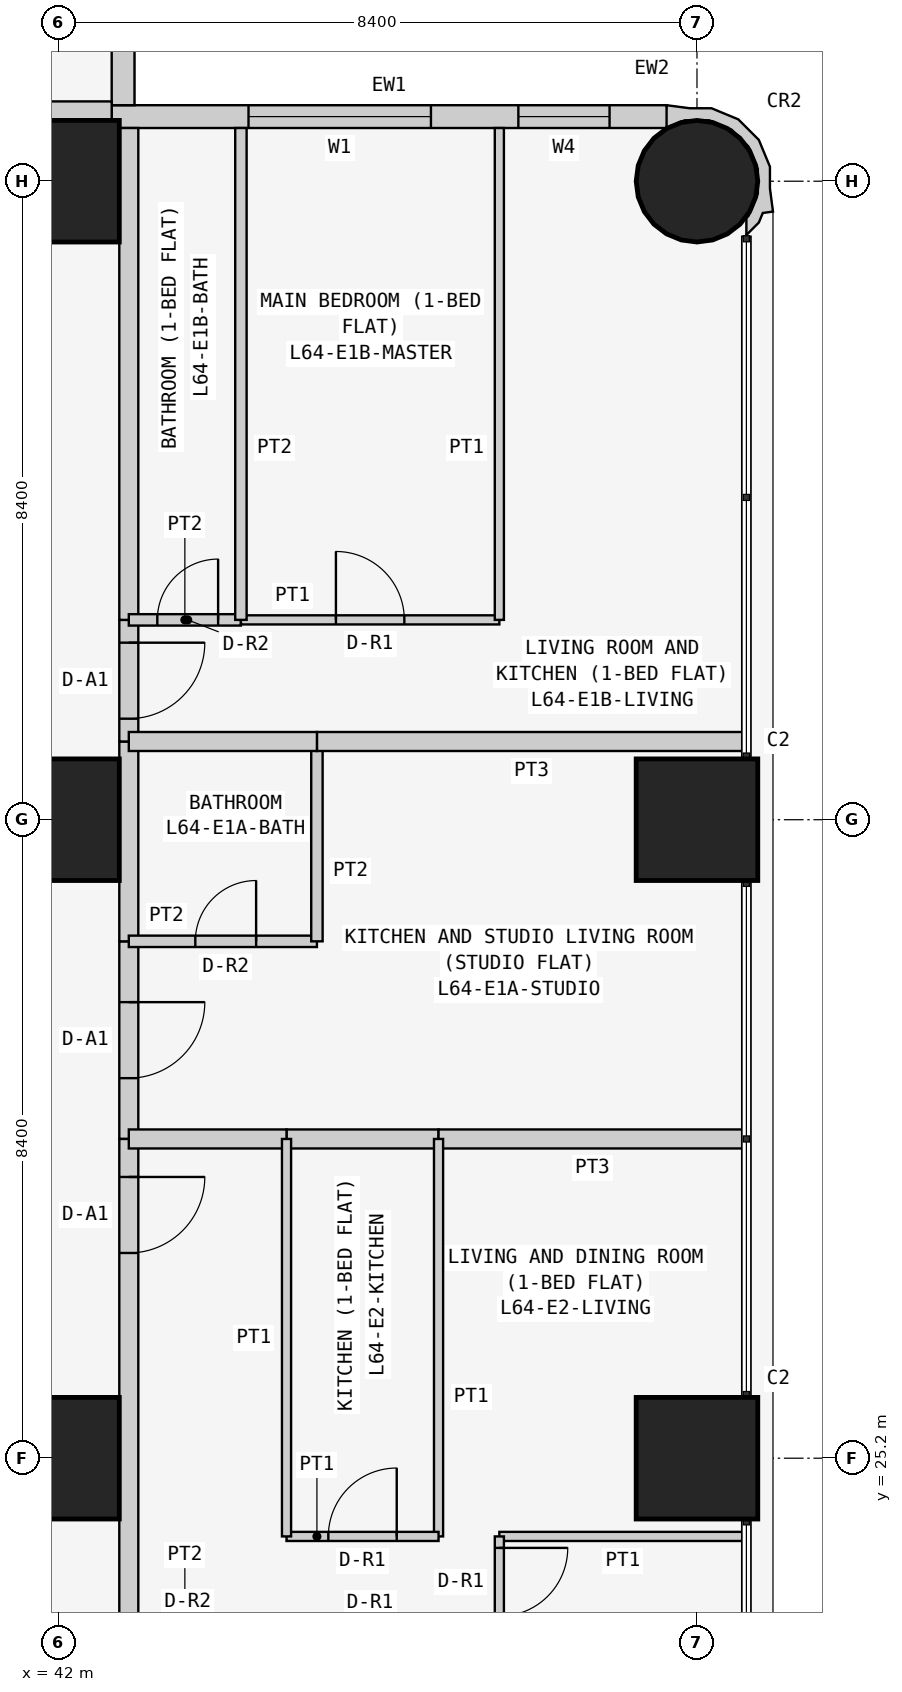
"""IFC4 building model, lengths in metres.
Left out: names, types, materials, properties, quantities, classifications, styles, units other than length and angle.
Written with IfcOpenShell. Run it as: python <this file> out.ifc"""

import sys

from ifc_helpers import new_model, si_unit, direction, frame, frame_2d, origin, origin_2d, place, context, subcontext, project, spatial, polyline, rectangle, circle, outline, extrude, element, fill, save


model = new_model("IFC4")
c1 = context("Model", 3, precision=1e-05, world=origin(), true_north=direction((0.0, 1.0)))
c2 = subcontext(c1, "Body", "Model", "MODEL_VIEW")
j1 = project(units=[si_unit("LENGTHUNIT", "METRE"), si_unit("PLANEANGLEUNIT", "RADIAN")], contexts=[c1])
p1 = place(None, origin())
s1 = spatial("IfcSite", under=j1, at=p1, CompositionType="ELEMENT")
p2 = place(p1, origin())
s2 = spatial("IfcBuilding", under=s1, at=p2, CompositionType="ELEMENT")
p3 = place(p2, frame((0.0, 0.0, 244.5)))
s3 = spatial("IfcBuildingStorey", under=s2, at=p3, CompositionType="ELEMENT", Elevation=244.5)
for number, where, z_axis, x_axis in (
    (1, (42.0, 25.2, 0.0), (0.0, 0.0, 1.0), (1.0, 0.0, 0.0)),
    (2, (42.0, 33.6, 0.0), (0.0, 0.0, 1.0), (1.0, 0.0, 0.0)),
    (3, (42.0, 42.0, 0.0), (0.0, 0.0, 1.0), (1.0, 0.0, 0.0)),
    (4, (50.4, 25.2, 0.0), (0.0, 0.0, 1.0), (1.0, 0.0, 0.0)),
    (5, (50.4, 33.6, 0.0), (0.0, 0.0, 1.0), (1.0, 0.0, 0.0)),
):
    element("IfcColumn", number, at=place(p3, frame(where, z_axis=z_axis, x_axis=x_axis)), inside=s3, PredefinedType="COLUMN", context=c2, shape_type="SweptSolid", body=[
        extrude(rectangle(XDim=1.6, YDim=1.6, at=origin_2d()), origin(), (0.0, 0.0, 1.0), 3.6),
    ])
p4 = place(p3, frame((50.4, 42.0, 0.0), z_axis=(0.0, 0.0, 1.0), x_axis=(1.0, 0.0, 0.0)))
e6 = element("IfcColumn", 6, at=p4, inside=s3, PredefinedType="COLUMN", context=c2, shape_type="SweptSolid", body=[
    extrude(circle(Radius=0.8, at=origin_2d()), origin(), (0.0, 0.0, 1.0), 3.6),
])
p5 = place(p3, frame((50.0, 42.85, 0.0), z_axis=(0.0, 0.0, 1.0), x_axis=(-1.0, 0.0, 0.0)))
e7 = element("IfcWall", 7, at=p5, inside=s3, PredefinedType="SOLIDWALL", context=c2, shape_type="SweptSolid", body=[
    extrude(rectangle(XDim=7.3, YDim=0.3, at=frame_2d((3.65, 0.0))), origin(), (0.0, 0.0, 1.0), 3.35),
])
p6 = place(p5, frame((3.1, 0.0, 0.9)))
e8 = element("IfcOpeningElement", 8, at=p6, cuts=e7, PredefinedType="OPENING", context=c2, shape_type="SweptSolid", body=[
    extrude(rectangle(XDim=2.4, YDim=1.5, at=frame_2d((1.2, 0.75))), frame((0.0, 0.16, 0.0), z_axis=(0.0, -1.0, 0.0), x_axis=(1.0, 0.0, 0.0)), (0.0, 0.0, 1.0), 0.32),
])
p7 = place(p5, frame((0.75, 0.0, 0.9)))
e9 = element("IfcOpeningElement", 9, at=p7, cuts=e7, PredefinedType="OPENING", context=c2, shape_type="SweptSolid", body=[
    extrude(rectangle(XDim=1.2, YDim=1.5, at=frame_2d((0.6, 0.75))), frame((0.0, 0.16, 0.0), z_axis=(0.0, -1.0, 0.0), x_axis=(1.0, 0.0, 0.0)), (0.0, 0.0, 1.0), 0.32),
])
p8 = place(p3, frame((42.85, 43.0, 0.0), z_axis=(0.0, 0.0, 1.0), x_axis=(0.0, 1.0, 0.0)))
e10 = element("IfcWall", 10, at=p8, inside=s3, PredefinedType="SOLIDWALL", context=c2, shape_type="SweptSolid", body=[
    extrude(rectangle(XDim=7.0, YDim=0.3, at=frame_2d((3.5, 0.0))), origin(), (0.0, 0.0, 1.0), 3.35),
])
p9 = place(p8, frame((1.5, 0.0, 0.9)))
e11 = element("IfcOpeningElement", 11, at=p9, cuts=e10, PredefinedType="OPENING", context=c2, shape_type="SweptSolid", body=[
    extrude(rectangle(XDim=2.4, YDim=1.5, at=frame_2d((1.2, 0.75))), frame((0.0, 0.16, 0.0), z_axis=(0.0, -1.0, 0.0), x_axis=(1.0, 0.0, 0.0)), (0.0, 0.0, 1.0), 0.32),
])
p10 = place(p8, frame((5.05, 0.0, 0.9)))
e12 = element("IfcOpeningElement", 12, at=p10, cuts=e10, PredefinedType="OPENING", context=c2, shape_type="SweptSolid", body=[
    extrude(rectangle(XDim=1.2, YDim=1.5, at=frame_2d((0.6, 0.75))), frame((0.0, 0.16, 0.0), z_axis=(0.0, -1.0, 0.0), x_axis=(1.0, 0.0, 0.0)), (0.0, 0.0, 1.0), 0.32),
])
p11 = place(p3, frame((50.995, 41.352, 0.0), z_axis=(0.0, 0.0, 1.0), x_axis=(0.93923434088, 0.343276641956, 0.0)))
e13 = element("IfcWall", 13, at=p11, inside=s3, PredefinedType="SOLIDWALL", context=c2, shape_type="SweptSolid", body=[
    extrude(outline(polyline([(0.532, 0.393), (0.631, 0.663), (0.614, 1.044), (0.453, 1.391), (0.172, 1.649), (-0.098, 1.748), (-0.369, 1.89), (-0.509, 1.621), (-0.491, 1.615), (-0.479, 1.609), (-0.211, 1.62), (0.088, 1.511), (0.323, 1.295), (0.457, 1.006), (0.47, 0.688), (0.361, 0.389), (0.145, 0.154), (0.108, 0.136), (0.031, -0.075), (0.241, 0.023), (0.333, 0.124), (0.465, 0.094), (0.532, 0.393)])), origin(), (0.0, 0.0, 1.0), 3.35),
])
p12 = place(p3, frame((35.829, 42.925, 0.0), z_axis=(0.0, 0.0, 1.0), x_axis=(1.0, 0.0, 0.0)))
e14 = element("IfcWall", 14, at=p12, inside=s3, PredefinedType="PARTITIONING", context=c2, shape_type="SweptSolid", body=[
    extrude(rectangle(XDim=6.871, YDim=0.25, at=frame_2d((3.436, 0.0))), origin(), (0.0, 0.0, 1.0), 3.35),
])
p13 = place(p3, frame((42.925, 32.0, 0.0), z_axis=(0.0, 0.0, 1.0), x_axis=(0.0, -1.0, 0.0)))
e15 = element("IfcWall", 15, at=p13, inside=s3, PredefinedType="PARTITIONING", context=c2, shape_type="SweptSolid", body=[
    extrude(rectangle(XDim=2.6, YDim=0.25, at=frame_2d((1.3, 0.0))), origin(), (0.0, 0.0, 1.0), 3.35),
])
p14 = place(p13, frame((0.8, 0.0, 0.0)))
e16 = element("IfcOpeningElement", 16, at=p14, cuts=e15, PredefinedType="OPENING", context=c2, shape_type="SweptSolid", body=[
    extrude(rectangle(XDim=1.0, YDim=2.1, at=frame_2d((0.5, 1.05))), frame((0.0, 0.135, 0.0), z_axis=(0.0, -1.0, 0.0), x_axis=(1.0, 0.0, 0.0)), (0.0, 0.0, 1.0), 0.27),
])
p15 = place(p3, frame((42.925, 34.629, 0.0), z_axis=(0.0, 0.0, 1.0), x_axis=(0.0, -1.0, 0.0)))
e17 = element("IfcWall", 17, at=p15, inside=s3, PredefinedType="PARTITIONING", context=c2, shape_type="SweptSolid", body=[
    extrude(rectangle(XDim=2.629, YDim=0.25, at=frame_2d((1.314, 0.0))), origin(), (0.0, 0.0, 1.0), 3.35),
])
p16 = place(p3, frame((42.925, 36.229, 0.0), z_axis=(0.0, 0.0, 1.0), x_axis=(0.0, -1.0, 0.0)))
e18 = element("IfcWall", 18, at=p16, inside=s3, PredefinedType="PARTITIONING", context=c2, shape_type="SweptSolid", body=[
    extrude(rectangle(XDim=1.6, YDim=0.25, at=frame_2d((0.8, 0.0))), origin(), (0.0, 0.0, 1.0), 3.35),
])
p17 = place(p16, frame((0.3, 0.0, 0.0)))
e19 = element("IfcOpeningElement", 19, at=p17, cuts=e18, PredefinedType="OPENING", context=c2, shape_type="SweptSolid", body=[
    extrude(rectangle(XDim=1.0, YDim=2.1, at=frame_2d((0.5, 1.05))), frame((0.0, 0.135, 0.0), z_axis=(0.0, -1.0, 0.0), x_axis=(1.0, 0.0, 0.0)), (0.0, 0.0, 1.0), 0.27),
])
p18 = place(p3, frame((42.925, 42.7, 0.0), z_axis=(0.0, 0.0, 1.0), x_axis=(0.0, -1.0, 0.0)))
e20 = element("IfcWall", 20, at=p18, inside=s3, PredefinedType="PARTITIONING", context=c2, shape_type="SweptSolid", body=[
    extrude(rectangle(XDim=6.471, YDim=0.25, at=frame_2d((3.235, 0.0))), origin(), (0.0, 0.0, 1.0), 3.35),
])
p19 = place(p3, frame((42.925, 29.4, 0.0), z_axis=(0.0, 0.0, 1.0), x_axis=(0.0, -1.0, 0.0)))
e21 = element("IfcWall", 21, at=p19, inside=s3, PredefinedType="PARTITIONING", context=c2, shape_type="SweptSolid", body=[
    extrude(rectangle(XDim=6.429, YDim=0.25, at=frame_2d((3.214, 0.0))), origin(), (0.0, 0.0, 1.0), 3.35),
])
p20 = place(p19, frame((0.5, 0.0, 0.0)))
e22 = element("IfcOpeningElement", 22, at=p20, cuts=e21, PredefinedType="OPENING", context=c2, shape_type="SweptSolid", body=[
    extrude(rectangle(XDim=1.0, YDim=2.1, at=frame_2d((0.5, 1.05))), frame((0.0, 0.135, 0.0), z_axis=(0.0, -1.0, 0.0), x_axis=(1.0, 0.0, 0.0)), (0.0, 0.0, 1.0), 0.27),
])
p21 = place(p3, frame((42.925, 32.0, 0.0), z_axis=(0.0, 0.0, 1.0), x_axis=(1.0, 0.0, 0.0)))
e23 = element("IfcWall", 23, at=p21, inside=s3, PredefinedType="PARTITIONING", context=c2, shape_type="SweptSolid", body=[
    extrude(rectangle(XDim=2.475, YDim=0.15, at=frame_2d((1.237, 0.0))), origin(), (0.0, 0.0, 1.0), 3.35),
])
p22 = place(p21, frame((0.875, 0.0, 0.0)))
e24 = element("IfcOpeningElement", 24, at=p22, cuts=e23, PredefinedType="OPENING", context=c2, shape_type="SweptSolid", body=[
    extrude(rectangle(XDim=0.8, YDim=2.1, at=frame_2d((0.4, 1.05))), frame((0.0, 0.085, 0.0), z_axis=(0.0, -1.0, 0.0), x_axis=(1.0, 0.0, 0.0)), (0.0, 0.0, 1.0), 0.17),
])
p23 = place(p3, frame((45.4, 32.0, 0.0), z_axis=(0.0, 0.0, 1.0), x_axis=(0.0, 1.0, 0.0)))
e25 = element("IfcWall", 25, at=p23, inside=s3, PredefinedType="PARTITIONING", context=c2, shape_type="SweptSolid", body=[
    extrude(rectangle(XDim=2.629, YDim=0.15, at=frame_2d((1.314, 0.0))), origin(), (0.0, 0.0, 1.0), 3.35),
])
p24 = place(p3, frame((45.4, 34.629, 0.0), z_axis=(0.0, 0.0, 1.0), x_axis=(1.0, 0.0, 0.0)))
e26 = element("IfcWall", 26, at=p24, inside=s3, PredefinedType="PARTITIONING", context=c2, shape_type="SweptSolid", body=[
    extrude(rectangle(XDim=5.65, YDim=0.25, at=frame_2d((2.825, 0.0))), origin(), (0.0, 0.0, 1.0), 3.35),
])
p25 = place(p3, frame((47.0, 29.4, 0.0), z_axis=(0.0, 0.0, 1.0), x_axis=(-1.0, 0.0, 0.0)))
e27 = element("IfcWall", 27, at=p25, inside=s3, PredefinedType="PARTITIONING", context=c2, shape_type="SweptSolid", body=[
    extrude(rectangle(XDim=2.0, YDim=0.25, at=frame_2d((1.0, 0.0))), origin(), (0.0, 0.0, 1.0), 3.35),
])
p26 = place(p3, frame((45.0, 29.4, 0.0), z_axis=(0.0, 0.0, 1.0), x_axis=(-1.0, 0.0, 0.0)))
e28 = element("IfcWall", 28, at=p26, inside=s3, PredefinedType="PARTITIONING", context=c2, shape_type="SweptSolid", body=[
    extrude(rectangle(XDim=2.075, YDim=0.25, at=frame_2d((1.038, 0.0))), origin(), (0.0, 0.0, 1.0), 3.35),
])
p27 = place(p3, frame((51.05, 29.4, 0.0), z_axis=(0.0, 0.0, 1.0), x_axis=(-1.0, 0.0, 0.0)))
e29 = element("IfcWall", 29, at=p27, inside=s3, PredefinedType="PARTITIONING", context=c2, shape_type="SweptSolid", body=[
    extrude(rectangle(XDim=4.05, YDim=0.25, at=frame_2d((2.025, 0.0))), origin(), (0.0, 0.0, 1.0), 3.35),
])
p28 = place(p3, frame((45.4, 34.629, 0.0), z_axis=(0.0, 0.0, 1.0), x_axis=(-1.0, 0.0, 0.0)))
e30 = element("IfcWall", 30, at=p28, inside=s3, PredefinedType="PARTITIONING", context=c2, shape_type="SweptSolid", body=[
    extrude(rectangle(XDim=2.475, YDim=0.25, at=frame_2d((1.237, 0.0))), origin(), (0.0, 0.0, 1.0), 3.35),
])
p29 = place(p3, frame((42.925, 36.229, 0.0), z_axis=(0.0, 0.0, 1.0), x_axis=(1.0, 0.0, 0.0)))
e31 = element("IfcWall", 31, at=p29, inside=s3, PredefinedType="PARTITIONING", context=c2, shape_type="SweptSolid", body=[
    extrude(rectangle(XDim=1.475, YDim=0.15, at=frame_2d((0.737, 0.0))), origin(), (0.0, 0.0, 1.0), 3.35),
])
p30 = place(p29, frame((0.375, 0.0, 0.0)))
e32 = element("IfcOpeningElement", 32, at=p30, cuts=e31, PredefinedType="OPENING", context=c2, shape_type="SweptSolid", body=[
    extrude(rectangle(XDim=0.8, YDim=2.1, at=frame_2d((0.4, 1.05))), frame((0.0, 0.085, 0.0), z_axis=(0.0, -1.0, 0.0), x_axis=(1.0, 0.0, 0.0)), (0.0, 0.0, 1.0), 0.17),
])
p31 = place(p3, frame((44.4, 36.229, 0.0), z_axis=(0.0, 0.0, 1.0), x_axis=(1.0, 0.0, 0.0)))
e33 = element("IfcWall", 33, at=p31, inside=s3, PredefinedType="PARTITIONING", context=c2, shape_type="SweptSolid", body=[
    extrude(rectangle(XDim=3.4, YDim=0.12, at=frame_2d((1.7, 0.0))), origin(), (0.0, 0.0, 1.0), 3.35),
])
p32 = place(p31, frame((1.25, 0.0, 0.0)))
e34 = element("IfcOpeningElement", 34, at=p32, cuts=e33, PredefinedType="OPENING", context=c2, shape_type="SweptSolid", body=[
    extrude(rectangle(XDim=0.9, YDim=2.1, at=frame_2d((0.45, 1.05))), frame((0.0, 0.07, 0.0), z_axis=(0.0, -1.0, 0.0), x_axis=(1.0, 0.0, 0.0)), (0.0, 0.0, 1.0), 0.14),
])
p33 = place(p3, frame((47.8, 36.229, 0.0), z_axis=(0.0, 0.0, 1.0), x_axis=(0.0, 1.0, 0.0)))
e35 = element("IfcWall", 35, at=p33, inside=s3, PredefinedType="PARTITIONING", context=c2, shape_type="SweptSolid", body=[
    extrude(rectangle(XDim=6.471, YDim=0.12, at=frame_2d((3.235, 0.0))), origin(), (0.0, 0.0, 1.0), 3.35),
])
p34 = place(p3, frame((44.4, 36.229, 0.0), z_axis=(0.0, 0.0, 1.0), x_axis=(0.0, 1.0, 0.0)))
e36 = element("IfcWall", 36, at=p34, inside=s3, PredefinedType="PARTITIONING", context=c2, shape_type="SweptSolid", body=[
    extrude(rectangle(XDim=6.471, YDim=0.15, at=frame_2d((3.235, 0.0))), origin(), (0.0, 0.0, 1.0), 3.35),
])
p35 = place(p3, frame((47.0, 29.4, 0.0), z_axis=(0.0, 0.0, 1.0), x_axis=(0.0, -1.0, 0.0)))
e37 = element("IfcWall", 37, at=p35, inside=s3, PredefinedType="PARTITIONING", context=c2, shape_type="SweptSolid", body=[
    extrude(rectangle(XDim=5.229, YDim=0.12, at=frame_2d((2.615, 0.0))), origin(), (0.0, 0.0, 1.0), 3.35),
])
p36 = place(p3, frame((47.0, 24.171, 0.0), z_axis=(0.0, 0.0, 1.0), x_axis=(-1.0, 0.0, 0.0)))
e38 = element("IfcWall", 38, at=p36, inside=s3, PredefinedType="PARTITIONING", context=c2, shape_type="SweptSolid", body=[
    extrude(rectangle(XDim=2.0, YDim=0.12, at=frame_2d((1.0, 0.0))), origin(), (0.0, 0.0, 1.0), 3.35),
])
p37 = place(p36, frame((0.55, 0.0, 0.0)))
e39 = element("IfcOpeningElement", 39, at=p37, cuts=e38, PredefinedType="OPENING", context=c2, shape_type="SweptSolid", body=[
    extrude(rectangle(XDim=0.9, YDim=2.1, at=frame_2d((0.45, 1.05))), frame((0.0, 0.07, 0.0), z_axis=(0.0, -1.0, 0.0), x_axis=(1.0, 0.0, 0.0)), (0.0, 0.0, 1.0), 0.14),
])
p38 = place(p3, frame((45.0, 24.171, 0.0), z_axis=(0.0, 0.0, 1.0), x_axis=(0.0, 1.0, 0.0)))
e40 = element("IfcWall", 40, at=p38, inside=s3, PredefinedType="PARTITIONING", context=c2, shape_type="SweptSolid", body=[
    extrude(rectangle(XDim=5.229, YDim=0.12, at=frame_2d((2.615, 0.0))), origin(), (0.0, 0.0, 1.0), 3.35),
])
p39 = place(p3, frame((51.05, 24.171, 0.0), z_axis=(0.0, 0.0, 1.0), x_axis=(-1.0, 0.0, 0.0)))
e41 = element("IfcWall", 41, at=p39, inside=s3, PredefinedType="PARTITIONING", context=c2, shape_type="SweptSolid", body=[
    extrude(rectangle(XDim=3.25, YDim=0.12, at=frame_2d((1.625, 0.0))), origin(), (0.0, 0.0, 1.0), 3.35),
])
p40 = place(p3, frame((47.8, 24.171, 0.0), z_axis=(0.0, 0.0, 1.0), x_axis=(0.0, -1.0, 0.0)))
e42 = element("IfcWall", 42, at=p40, inside=s3, PredefinedType="PARTITIONING", context=c2, shape_type="SweptSolid", body=[
    extrude(rectangle(XDim=1.2, YDim=0.12, at=frame_2d((0.6, 0.0))), origin(), (0.0, 0.0, 1.0), 3.35),
])
p41 = place(p40, frame((0.151, 0.0, 0.0)))
e43 = element("IfcOpeningElement", 43, at=p41, cuts=e42, PredefinedType="OPENING", context=c2, shape_type="SweptSolid", body=[
    extrude(rectangle(XDim=0.9, YDim=2.1, at=frame_2d((0.45, 1.05))), frame((0.0, 0.07, 0.0), z_axis=(0.0, -1.0, 0.0), x_axis=(1.0, 0.0, 0.0)), (0.0, 0.0, 1.0), 0.14),
])
p42 = place(p6, origin())
e44 = element("IfcWindow", 44, at=p42, inside=s3, PartitioningType="SINGLE_PANEL", PredefinedType="WINDOW", context=c2, shape_type="SweptSolid", body=[
    extrude(rectangle(XDim=2.4, YDim=1.5, at=frame_2d((1.2, 0.75))), frame((0.0, 0.03, 0.0), z_axis=(0.0, -1.0, 0.0), x_axis=(1.0, 0.0, 0.0)), (0.0, 0.0, 1.0), 0.06),
])
fill(e8, e44)
p43 = place(p7, origin())
e45 = element("IfcWindow", 45, at=p43, inside=s3, PartitioningType="SINGLE_PANEL", PredefinedType="WINDOW", context=c2, shape_type="SweptSolid", body=[
    extrude(rectangle(XDim=1.2, YDim=1.5, at=frame_2d((0.6, 0.75))), frame((0.0, 0.03, 0.0), z_axis=(0.0, -1.0, 0.0), x_axis=(1.0, 0.0, 0.0)), (0.0, 0.0, 1.0), 0.06),
])
fill(e9, e45)
p44 = place(p14, origin())
e46 = element("IfcDoor", 46, at=p44, inside=s3, OperationType="SINGLE_SWING_LEFT", PredefinedType="DOOR", context=c2, shape_type="SweptSolid", body=[
    extrude(rectangle(XDim=1.0, YDim=2.1, at=frame_2d((0.5, 1.05))), frame((0.0, 0.025, 0.0), z_axis=(0.0, -1.0, 0.0), x_axis=(1.0, 0.0, 0.0)), (0.0, 0.0, 1.0), 0.05),
])
fill(e16, e46)
p45 = place(p22, origin())
e47 = element("IfcDoor", 47, at=p45, inside=s3, OperationType="SINGLE_SWING_RIGHT", PredefinedType="DOOR", context=c2, shape_type="SweptSolid", body=[
    extrude(rectangle(XDim=0.8, YDim=2.1, at=frame_2d((0.4, 1.05))), frame((0.0, 0.025, 0.0), z_axis=(0.0, -1.0, 0.0), x_axis=(1.0, 0.0, 0.0)), (0.0, 0.0, 1.0), 0.05),
])
fill(e24, e47)
p46 = place(p17, origin())
e48 = element("IfcDoor", 48, at=p46, inside=s3, OperationType="SINGLE_SWING_LEFT", PredefinedType="DOOR", context=c2, shape_type="SweptSolid", body=[
    extrude(rectangle(XDim=1.0, YDim=2.1, at=frame_2d((0.5, 1.05))), frame((0.0, 0.025, 0.0), z_axis=(0.0, -1.0, 0.0), x_axis=(1.0, 0.0, 0.0)), (0.0, 0.0, 1.0), 0.05),
])
fill(e19, e48)
p47 = place(p30, origin())
e49 = element("IfcDoor", 49, at=p47, inside=s3, OperationType="SINGLE_SWING_RIGHT", PredefinedType="DOOR", context=c2, shape_type="SweptSolid", body=[
    extrude(rectangle(XDim=0.8, YDim=2.1, at=frame_2d((0.4, 1.05))), frame((0.0, 0.025, 0.0), z_axis=(0.0, -1.0, 0.0), x_axis=(1.0, 0.0, 0.0)), (0.0, 0.0, 1.0), 0.05),
])
fill(e32, e49)
p48 = place(p32, origin())
e50 = element("IfcDoor", 50, at=p48, inside=s3, OperationType="SINGLE_SWING_LEFT", PredefinedType="DOOR", context=c2, shape_type="SweptSolid", body=[
    extrude(rectangle(XDim=0.9, YDim=2.1, at=frame_2d((0.45, 1.05))), frame((0.0, 0.025, 0.0), z_axis=(0.0, -1.0, 0.0), x_axis=(1.0, 0.0, 0.0)), (0.0, 0.0, 1.0), 0.05),
])
fill(e34, e50)
p49 = place(p20, origin())
e51 = element("IfcDoor", 51, at=p49, inside=s3, OperationType="SINGLE_SWING_LEFT", PredefinedType="DOOR", context=c2, shape_type="SweptSolid", body=[
    extrude(rectangle(XDim=1.0, YDim=2.1, at=frame_2d((0.5, 1.05))), frame((0.0, 0.025, 0.0), z_axis=(0.0, -1.0, 0.0), x_axis=(1.0, 0.0, 0.0)), (0.0, 0.0, 1.0), 0.05),
])
fill(e22, e51)
p50 = place(p37, frame((0.9, 0.0, 0.0), z_axis=(0.0, 0.0, 1.0), x_axis=(-1.0, 0.0, 0.0)))
e52 = element("IfcDoor", 52, at=p50, inside=s3, OperationType="SINGLE_SWING_RIGHT", PredefinedType="DOOR", context=c2, shape_type="SweptSolid", body=[
    extrude(rectangle(XDim=0.9, YDim=2.1, at=frame_2d((0.45, 1.05))), frame((0.0, 0.025, 0.0), z_axis=(0.0, -1.0, 0.0), x_axis=(1.0, 0.0, 0.0)), (0.0, 0.0, 1.0), 0.05),
])
fill(e39, e52)
p51 = place(p41, origin())
e53 = element("IfcDoor", 53, at=p51, inside=s3, OperationType="SINGLE_SWING_LEFT", PredefinedType="DOOR", context=c2, shape_type="SweptSolid", body=[
    extrude(rectangle(XDim=0.9, YDim=2.1, at=frame_2d((0.45, 1.05))), frame((0.0, 0.025, 0.0), z_axis=(0.0, -1.0, 0.0), x_axis=(1.0, 0.0, 0.0)), (0.0, 0.0, 1.0), 0.05),
])
fill(e43, e53)
save(model, sys.argv[1])
